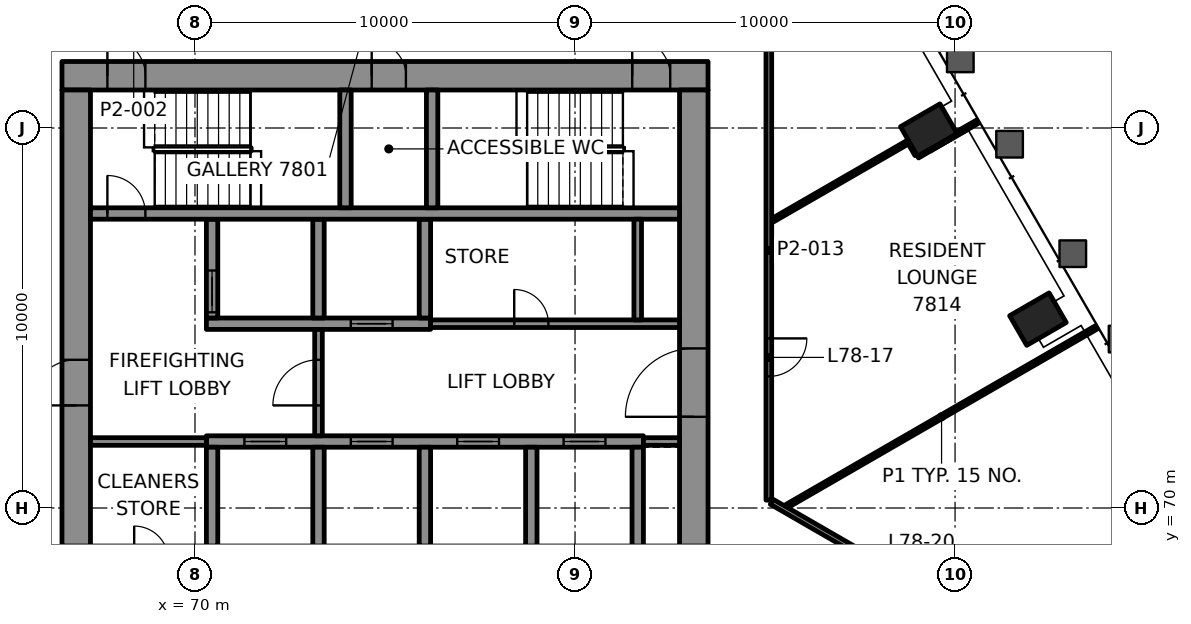
"""IFC4 building model, lengths in metres.
Left out: names, types, materials, properties, quantities, classifications, styles, units other than length and angle.
Written with IfcOpenShell. Run it as: python <this file> out.ifc"""

import sys

from ifc_helpers import new_model, si_unit, direction, frame, frame_2d, origin, origin_2d, place, context, subcontext, project, spatial, rectangle, hollow_rectangle, extrude, element, fill, save


model = new_model("IFC4")
c1 = context("Model", 3, precision=1e-05, world=origin(), true_north=direction((0.0, 1.0)))
c2 = subcontext(c1, "Body", "Model", "MODEL_VIEW")
j1 = project(units=[si_unit("LENGTHUNIT", "METRE"), si_unit("PLANEANGLEUNIT", "RADIAN")], contexts=[c1])
p1 = place(None, origin())
s1 = spatial("IfcSite", under=j1, at=p1, CompositionType="ELEMENT")
p2 = place(p1, origin())
s2 = spatial("IfcBuilding", under=s1, at=p2, CompositionType="ELEMENT")
p3 = place(p2, frame((0.0, 0.0, 319.6)))
s3 = spatial("IfcBuildingStorey", under=s2, at=p3, CompositionType="ELEMENT", Elevation=319.6)
for number, where, z_axis, x_axis in (
    (1, (92.181, 74.97, -0.0), (0.0, 0.0, 1.0), (-0.5, 0.866, 0.0)),
    (2, (89.309, 79.945, -0.0), (0.0, 0.0, 1.0), (-0.5, 0.866, 0.0)),
):
    element("IfcColumn", number, at=place(p3, frame(where, z_axis=z_axis, x_axis=x_axis)), inside=s3, PredefinedType="COLUMN", context=c2, shape_type="SweptSolid", body=[
        extrude(hollow_rectangle(XDim=0.9, YDim=1.2, WallThickness=0.06, at=origin_2d()), origin(), (0.0, 0.0, 1.0), 3.5),
    ])
p4 = place(p3, frame((66.5, 81.375, 0.0), z_axis=(0.0, 0.0, 1.0), x_axis=(1.0, 0.0, 0.0)))
e3 = element("IfcWall", 3, at=p4, inside=s3, PredefinedType="SHEAR", context=c2, shape_type="SweptSolid", body=[
    extrude(rectangle(XDim=17.0, YDim=0.75, at=frame_2d((8.5, 0.0))), origin(), (0.0, 0.0, 1.0), 3.3),
])
p5 = place(p4, frame((1.195, 0.0, 0.0)))
e4 = element("IfcOpeningElement", 4, at=p5, cuts=e3, PredefinedType="OPENING", context=c2, shape_type="SweptSolid", body=[
    extrude(rectangle(XDim=1.0, YDim=2.1, at=frame_2d((0.5, 1.05))), frame((0.0, 0.385, 0.0), z_axis=(0.0, -1.0, 0.0), x_axis=(1.0, 0.0, 0.0)), (0.0, 0.0, 1.0), 0.77),
])
p6 = place(p4, frame((15.005, 0.0, 0.0)))
e5 = element("IfcOpeningElement", 5, at=p6, cuts=e3, PredefinedType="OPENING", context=c2, shape_type="SweptSolid", body=[
    extrude(rectangle(XDim=1.0, YDim=2.1, at=frame_2d((0.5, 1.05))), frame((0.0, 0.385, 0.0), z_axis=(0.0, -1.0, 0.0), x_axis=(1.0, 0.0, 0.0)), (0.0, 0.0, 1.0), 0.77),
])
p7 = place(p4, frame((8.15, 0.0, 0.0)))
e6 = element("IfcOpeningElement", 6, at=p7, cuts=e3, PredefinedType="OPENING", context=c2, shape_type="SweptSolid", body=[
    extrude(rectangle(XDim=0.9, YDim=2.1, at=frame_2d((0.45, 1.05))), frame((0.0, 0.385, 0.0), z_axis=(0.0, -1.0, 0.0), x_axis=(1.0, 0.0, 0.0)), (0.0, 0.0, 1.0), 0.77),
])
p8 = place(p3, frame((66.875, 69.0, 0.0), z_axis=(0.0, 0.0, 1.0), x_axis=(0.0, 1.0, 0.0)))
e7 = element("IfcWall", 7, at=p8, inside=s3, PredefinedType="SHEAR", context=c2, shape_type="SweptSolid", body=[
    extrude(rectangle(XDim=12.0, YDim=0.75, at=frame_2d((6.0, 0.0))), origin(), (0.0, 0.0, 1.0), 3.3),
])
p9 = place(p8, frame((3.7, 0.0, 0.0)))
e8 = element("IfcOpeningElement", 8, at=p9, cuts=e7, PredefinedType="OPENING", context=c2, shape_type="SweptSolid", body=[
    extrude(rectangle(XDim=1.2, YDim=2.1, at=frame_2d((0.6, 1.05))), frame((0.0, 0.385, 0.0), z_axis=(0.0, -1.0, 0.0), x_axis=(1.0, 0.0, 0.0)), (0.0, 0.0, 1.0), 0.77),
])
p10 = place(p3, frame((83.125, 69.0, 0.0), z_axis=(0.0, 0.0, 1.0), x_axis=(0.0, 1.0, 0.0)))
e9 = element("IfcWall", 9, at=p10, inside=s3, PredefinedType="SHEAR", context=c2, shape_type="SweptSolid", body=[
    extrude(rectangle(XDim=12.0, YDim=0.75, at=frame_2d((6.0, 0.0))), origin(), (0.0, 0.0, 1.0), 3.3),
])
p11 = place(p10, frame((3.4, 0.0, 0.0)))
e10 = element("IfcOpeningElement", 10, at=p11, cuts=e9, PredefinedType="OPENING", context=c2, shape_type="SweptSolid", body=[
    extrude(rectangle(XDim=1.8, YDim=2.1, at=frame_2d((0.9, 1.05))), frame((0.0, 0.385, 0.0), z_axis=(0.0, -1.0, 0.0), x_axis=(1.0, 0.0, 0.0)), (0.0, 0.0, 1.0), 0.77),
])
p12 = place(p3, frame((70.3, 71.75, 0.0), z_axis=(0.0, 0.0, 1.0), x_axis=(1.0, 0.0, 0.0)))
e11 = element("IfcWall", 11, at=p12, inside=s3, PredefinedType="SHEAR", context=c2, shape_type="SweptSolid", body=[
    extrude(rectangle(XDim=11.5, YDim=0.3, at=frame_2d((5.75, 0.0))), origin(), (0.0, 0.0, 1.0), 3.3),
])
p13 = place(p12, frame((1.0, 0.0, 0.0)))
e12 = element("IfcOpeningElement", 12, at=p13, cuts=e11, PredefinedType="OPENING", context=c2, shape_type="SweptSolid", body=[
    extrude(rectangle(XDim=1.1, YDim=2.1, at=frame_2d((0.55, 1.05))), frame((0.0, 0.16, 0.0), z_axis=(0.0, -1.0, 0.0), x_axis=(1.0, 0.0, 0.0)), (0.0, 0.0, 1.0), 0.32),
])
p14 = place(p12, frame((3.8, 0.0, 0.0)))
e13 = element("IfcOpeningElement", 13, at=p14, cuts=e11, PredefinedType="OPENING", context=c2, shape_type="SweptSolid", body=[
    extrude(rectangle(XDim=1.1, YDim=2.1, at=frame_2d((0.55, 1.05))), frame((0.0, 0.16, 0.0), z_axis=(0.0, -1.0, 0.0), x_axis=(1.0, 0.0, 0.0)), (0.0, 0.0, 1.0), 0.32),
])
p15 = place(p12, frame((6.6, 0.0, 0.0)))
e14 = element("IfcOpeningElement", 14, at=p15, cuts=e11, PredefinedType="OPENING", context=c2, shape_type="SweptSolid", body=[
    extrude(rectangle(XDim=1.1, YDim=2.1, at=frame_2d((0.55, 1.05))), frame((0.0, 0.16, 0.0), z_axis=(0.0, -1.0, 0.0), x_axis=(1.0, 0.0, 0.0)), (0.0, 0.0, 1.0), 0.32),
])
p16 = place(p12, frame((9.4, 0.0, 0.0)))
e15 = element("IfcOpeningElement", 15, at=p16, cuts=e11, PredefinedType="OPENING", context=c2, shape_type="SweptSolid", body=[
    extrude(rectangle(XDim=1.1, YDim=2.1, at=frame_2d((0.55, 1.05))), frame((0.0, 0.16, 0.0), z_axis=(0.0, -1.0, 0.0), x_axis=(1.0, 0.0, 0.0)), (0.0, 0.0, 1.0), 0.32),
])
p17 = place(p3, frame((70.3, 74.85, 0.0), z_axis=(0.0, 0.0, 1.0), x_axis=(1.0, 0.0, 0.0)))
e16 = element("IfcWall", 16, at=p17, inside=s3, PredefinedType="SHEAR", context=c2, shape_type="SweptSolid", body=[
    extrude(rectangle(XDim=5.9, YDim=0.3, at=frame_2d((2.95, 0.0))), origin(), (0.0, 0.0, 1.0), 3.3),
])
p18 = place(p17, frame((3.8, 0.0, 0.0)))
e17 = element("IfcOpeningElement", 17, at=p18, cuts=e16, PredefinedType="OPENING", context=c2, shape_type="SweptSolid", body=[
    extrude(rectangle(XDim=1.1, YDim=2.1, at=frame_2d((0.55, 1.05))), frame((0.0, 0.16, 0.0), z_axis=(0.0, -1.0, 0.0), x_axis=(1.0, 0.0, 0.0)), (0.0, 0.0, 1.0), 0.32),
])
p19 = place(p3, frame((70.45, 69.0, 0.0), z_axis=(0.0, 0.0, 1.0), x_axis=(0.0, 1.0, 0.0)))
e18 = element("IfcWall", 18, at=p19, inside=s3, PredefinedType="SHEAR", context=c2, shape_type="SweptSolid", body=[
    extrude(rectangle(XDim=2.6, YDim=0.3, at=frame_2d((1.3, 0.0))), origin(), (0.0, 0.0, 1.0), 3.3),
])
p20 = place(p3, frame((70.45, 75.0, 0.0), z_axis=(0.0, 0.0, 1.0), x_axis=(0.0, 1.0, 0.0)))
e19 = element("IfcWall", 19, at=p20, inside=s3, PredefinedType="SHEAR", context=c2, shape_type="SweptSolid", body=[
    extrude(rectangle(XDim=2.6, YDim=0.3, at=frame_2d((1.3, 0.0))), origin(), (0.0, 0.0, 1.0), 3.3),
])
p21 = place(p20, frame((0.15, 0.0, 0.0)))
e20 = element("IfcOpeningElement", 20, at=p21, cuts=e19, PredefinedType="OPENING", context=c2, shape_type="SweptSolid", body=[
    extrude(rectangle(XDim=1.1, YDim=2.1, at=frame_2d((0.55, 1.05))), frame((0.0, 0.16, 0.0), z_axis=(0.0, -1.0, 0.0), x_axis=(1.0, 0.0, 0.0)), (0.0, 0.0, 1.0), 0.32),
])
for number, where, z_axis, x_axis in (
    (21, (73.25, 69.0, 0.0), (0.0, 0.0, 1.0), (0.0, 1.0, 0.0)),
    (22, (73.25, 75.0, 0.0), (0.0, 0.0, 1.0), (0.0, 1.0, 0.0)),
    (23, (76.05, 69.0, 0.0), (0.0, 0.0, 1.0), (0.0, 1.0, 0.0)),
    (24, (76.05, 75.0, 0.0), (0.0, 0.0, 1.0), (0.0, 1.0, 0.0)),
    (25, (78.85, 69.0, 0.0), (0.0, 0.0, 1.0), (0.0, 1.0, 0.0)),
    (26, (81.65, 69.0, 0.0), (0.0, 0.0, 1.0), (0.0, 1.0, 0.0)),
):
    element("IfcWall", number, at=place(p3, frame(where, z_axis=z_axis, x_axis=x_axis)), inside=s3, PredefinedType="SHEAR", context=c2, shape_type="SweptSolid", body=[
        extrude(rectangle(XDim=2.6, YDim=0.3, at=frame_2d((1.3, 0.0))), origin(), (0.0, 0.0, 1.0), 3.3),
    ])
p22 = place(p3, frame((67.25, 77.75, 0.0), z_axis=(0.0, 0.0, 1.0), x_axis=(1.0, 0.0, 0.0)))
e27 = element("IfcWall", 27, at=p22, inside=s3, PredefinedType="SHEAR", context=c2, shape_type="SweptSolid", body=[
    extrude(rectangle(XDim=15.5, YDim=0.3, at=frame_2d((7.75, 0.0))), origin(), (0.0, 0.0, 1.0), 3.3),
])
p23 = place(p22, frame((0.445, 0.0, 0.0)))
e28 = element("IfcOpeningElement", 28, at=p23, cuts=e27, PredefinedType="OPENING", context=c2, shape_type="SweptSolid", body=[
    extrude(rectangle(XDim=1.0, YDim=2.1, at=frame_2d((0.5, 1.05))), frame((0.0, 0.16, 0.0), z_axis=(0.0, -1.0, 0.0), x_axis=(1.0, 0.0, 0.0)), (0.0, 0.0, 1.0), 0.32),
])
for number, where, z_axis, x_axis in (
    (29, (73.96, 77.9, 0.0), (0.0, 0.0, 1.0), (0.0, 1.0, 0.0)),
    (30, (76.24, 77.9, 0.0), (0.0, 0.0, 1.0), (0.0, 1.0, 0.0)),
):
    element("IfcWall", number, at=place(p3, frame(where, z_axis=z_axis, x_axis=x_axis)), inside=s3, PredefinedType="SHEAR", context=c2, shape_type="SweptSolid", body=[
        extrude(rectangle(XDim=3.1, YDim=0.3, at=frame_2d((1.55, 0.0))), origin(), (0.0, 0.0, 1.0), 3.3),
    ])
p24 = place(p3, frame((85.574, 70.051, 0.0), z_axis=(0.0, 0.0, 1.0), x_axis=(0.86601302732, 0.500021436052, 0.0)))
e31 = element("IfcWall", 31, at=p24, inside=s3, PredefinedType="PARTITIONING", context=c2, shape_type="SweptSolid", body=[
    extrude(rectangle(XDim=9.401, YDim=0.1, at=frame_2d((4.7, 0.0))), origin(), (0.0, 0.0, 1.0), 2.688),
])
p25 = place(p3, frame((89.014, 79.255, 0.0), z_axis=(0.0, 0.0, 1.0), x_axis=(0.866038107287, 0.499977996243, 0.0)))
e32 = element("IfcWall", 32, at=p25, inside=s3, PredefinedType="PARTITIONING", context=c2, shape_type="SweptSolid", body=[
    extrude(rectangle(XDim=1.819, YDim=0.1, at=frame_2d((0.91, 0.0))), origin(), (0.0, 0.0, 1.0), 2.688),
])
p26 = place(p3, frame((85.201, 77.573, 0.0), z_axis=(0.0, 0.0, 1.0), x_axis=(0.866029543084, 0.499992830454, 0.0)))
e33 = element("IfcWall", 33, at=p26, inside=s3, PredefinedType="PARTITIONING", context=c2, shape_type="SweptSolid", body=[
    extrude(rectangle(XDim=4.143, YDim=0.1, at=frame_2d((2.071, 0.0))), origin(), (0.0, 0.0, 1.0), 2.7),
])
p27 = place(p3, frame((85.1, 83.349, 0.0), z_axis=(0.0, 0.0, 1.0), x_axis=(0.0, -1.0, 0.0)))
e34 = element("IfcWall", 34, at=p27, inside=s3, PredefinedType="PARTITIONING", context=c2, shape_type="SweptSolid", body=[
    extrude(rectangle(XDim=13.141, YDim=0.15, at=frame_2d((6.571, 0.0))), origin(), (0.0, 0.0, 1.0), 2.7),
])
p28 = place(p27, frame((8.886, 0.0, 0.0)))
e35 = element("IfcOpeningElement", 35, at=p28, cuts=e34, PredefinedType="OPENING", context=c2, shape_type="SweptSolid", body=[
    extrude(rectangle(XDim=1.0, YDim=2.1, at=frame_2d((0.5, 1.05))), frame((0.0, 0.085, 0.0), z_axis=(0.0, -1.0, 0.0), x_axis=(1.0, 0.0, 0.0)), (0.0, 0.0, 1.0), 0.17),
])
p29 = place(p3, frame((88.989, 79.299, 0.0), z_axis=(0.0, 0.0, 1.0), x_axis=(-0.500126092966, 0.865952591736, 0.0)))
e36 = element("IfcWall", 36, at=p29, inside=s3, PredefinedType="PARTITIONING", context=c2, shape_type="SweptSolid", body=[
    extrude(rectangle(XDim=0.349, YDim=0.1, at=frame_2d((0.175, 0.0))), origin(), (0.0, 0.0, 1.0), 2.7),
])
p30 = place(p3, frame((85.175, 70.165, 0.0), z_axis=(0.0, 0.0, 1.0), x_axis=(0.866024989193, -0.500000718093, 0.0)))
e37 = element("IfcWall", 37, at=p30, inside=s3, PredefinedType="PARTITIONING", context=c2, shape_type="SweptSolid", body=[
    extrude(rectangle(XDim=11.063, YDim=0.15, at=frame_2d((5.531, 0.0))), origin(), (0.0, 0.0, 1.0), 2.7),
])
p31 = place(p30, frame((5.102, 0.0, 0.0)))
e38 = element("IfcOpeningElement", 38, at=p31, cuts=e37, PredefinedType="OPENING", context=c2, shape_type="SweptSolid", body=[
    extrude(rectangle(XDim=1.0, YDim=2.1, at=frame_2d((0.5, 1.05))), frame((0.0, 0.085, 0.0), z_axis=(0.0, -1.0, 0.0), x_axis=(1.0, 0.0, 0.0)), (0.0, 0.0, 1.0), 0.17),
])
p32 = place(p3, frame((69.117, 103.238, 0.0), z_axis=(0.0, 0.0, 1.0), x_axis=(-0.500002433271, -0.86602399893, 0.0)))
e39 = element("IfcWall", 39, at=p32, inside=s3, PredefinedType="SOLIDWALL", context=c2, shape_type="SweptSolid", body=[
    extrude(rectangle(XDim=29.715, YDim=0.8, at=frame_2d((14.857, 0.0))), origin(), (0.0, 0.0, 1.0), 0.9),
])
p33 = place(p3, frame((67.25, 71.75, 0.0), z_axis=(0.0, 0.0, 1.0), x_axis=(1.0, 0.0, 0.0)))
e40 = element("IfcWall", 40, at=p33, inside=s3, PredefinedType="PARTITIONING", context=c2, shape_type="SweptSolid", body=[
    extrude(rectangle(XDim=3.05, YDim=0.2, at=frame_2d((1.525, 0.0))), origin(), (0.0, 0.0, 1.0), 3.3),
])
p34 = place(p3, frame((81.8, 71.75, 0.0), z_axis=(0.0, 0.0, 1.0), x_axis=(1.0, 0.0, 0.0)))
e41 = element("IfcWall", 41, at=p34, inside=s3, PredefinedType="PARTITIONING", context=c2, shape_type="SweptSolid", body=[
    extrude(rectangle(XDim=0.95, YDim=0.2, at=frame_2d((0.475, 0.0))), origin(), (0.0, 0.0, 1.0), 3.3),
])
p35 = place(p3, frame((76.2, 74.85, 0.0), z_axis=(0.0, 0.0, 1.0), x_axis=(1.0, 0.0, 0.0)))
e42 = element("IfcWall", 42, at=p35, inside=s3, PredefinedType="PARTITIONING", context=c2, shape_type="SweptSolid", body=[
    extrude(rectangle(XDim=6.55, YDim=0.2, at=frame_2d((3.275, 0.0))), origin(), (0.0, 0.0, 1.0), 3.3),
])
p36 = place(p35, frame((2.2, 0.0, 0.0)))
e43 = element("IfcOpeningElement", 43, at=p36, cuts=e42, PredefinedType="OPENING", context=c2, shape_type="SweptSolid", body=[
    extrude(rectangle(XDim=0.9, YDim=2.1, at=frame_2d((0.45, 1.05))), frame((0.0, 0.11, 0.0), z_axis=(0.0, -1.0, 0.0), x_axis=(1.0, 0.0, 0.0)), (0.0, 0.0, 1.0), 0.22),
])
p37 = place(p3, frame((73.25, 71.9, 0.0), z_axis=(0.0, 0.0, 1.0), x_axis=(0.0, 1.0, 0.0)))
e44 = element("IfcWall", 44, at=p37, inside=s3, PredefinedType="PARTITIONING", context=c2, shape_type="SweptSolid", body=[
    extrude(rectangle(XDim=2.8, YDim=0.2, at=frame_2d((1.4, 0.0))), origin(), (0.0, 0.0, 1.0), 3.3),
])
p38 = place(p37, frame((0.8, 0.0, 0.0)))
e45 = element("IfcOpeningElement", 45, at=p38, cuts=e44, PredefinedType="OPENING", context=c2, shape_type="SweptSolid", body=[
    extrude(rectangle(XDim=1.2, YDim=2.1, at=frame_2d((0.6, 1.05))), frame((0.0, 0.11, 0.0), z_axis=(0.0, -1.0, 0.0), x_axis=(1.0, 0.0, 0.0)), (0.0, 0.0, 1.0), 0.22),
])
p39 = place(p3, frame((81.65, 74.95, 0.0), z_axis=(0.0, 0.0, 1.0), x_axis=(0.0, 1.0, 0.0)))
e46 = element("IfcWall", 46, at=p39, inside=s3, PredefinedType="PARTITIONING", context=c2, shape_type="SweptSolid", body=[
    extrude(rectangle(XDim=2.65, YDim=0.2, at=frame_2d((1.325, 0.0))), origin(), (0.0, 0.0, 1.0), 3.3),
])
p40 = place(p28, origin())
e47 = element("IfcDoor", 47, at=p40, inside=s3, OperationType="SINGLE_SWING_RIGHT", PredefinedType="DOOR", context=c2, shape_type="SweptSolid", body=[
    extrude(rectangle(XDim=1.0, YDim=2.1, at=frame_2d((0.5, 1.05))), frame((0.0, 0.025, 0.0), z_axis=(0.0, -1.0, 0.0), x_axis=(1.0, 0.0, 0.0)), (0.0, 0.0, 1.0), 0.05),
])
fill(e35, e47)
p41 = place(p13, origin())
e48 = element("IfcDoor", 48, at=p41, inside=s3, OperationType="DOUBLE_DOOR_SLIDING", PredefinedType="DOOR", context=c2, shape_type="SweptSolid", body=[
    extrude(rectangle(XDim=1.1, YDim=2.1, at=frame_2d((0.55, 1.05))), frame((0.0, 0.025, 0.0), z_axis=(0.0, -1.0, 0.0), x_axis=(1.0, 0.0, 0.0)), (0.0, 0.0, 1.0), 0.05),
])
fill(e12, e48)
p42 = place(p14, origin())
e49 = element("IfcDoor", 49, at=p42, inside=s3, OperationType="DOUBLE_DOOR_SLIDING", PredefinedType="DOOR", context=c2, shape_type="SweptSolid", body=[
    extrude(rectangle(XDim=1.1, YDim=2.1, at=frame_2d((0.55, 1.05))), frame((0.0, 0.025, 0.0), z_axis=(0.0, -1.0, 0.0), x_axis=(1.0, 0.0, 0.0)), (0.0, 0.0, 1.0), 0.05),
])
fill(e13, e49)
p43 = place(p15, origin())
e50 = element("IfcDoor", 50, at=p43, inside=s3, OperationType="DOUBLE_DOOR_SLIDING", PredefinedType="DOOR", context=c2, shape_type="SweptSolid", body=[
    extrude(rectangle(XDim=1.1, YDim=2.1, at=frame_2d((0.55, 1.05))), frame((0.0, 0.025, 0.0), z_axis=(0.0, -1.0, 0.0), x_axis=(1.0, 0.0, 0.0)), (0.0, 0.0, 1.0), 0.05),
])
fill(e14, e50)
p44 = place(p16, origin())
e51 = element("IfcDoor", 51, at=p44, inside=s3, OperationType="DOUBLE_DOOR_SLIDING", PredefinedType="DOOR", context=c2, shape_type="SweptSolid", body=[
    extrude(rectangle(XDim=1.1, YDim=2.1, at=frame_2d((0.55, 1.05))), frame((0.0, 0.025, 0.0), z_axis=(0.0, -1.0, 0.0), x_axis=(1.0, 0.0, 0.0)), (0.0, 0.0, 1.0), 0.05),
])
fill(e15, e51)
p45 = place(p21, origin())
e52 = element("IfcDoor", 52, at=p45, inside=s3, OperationType="DOUBLE_DOOR_SLIDING", PredefinedType="DOOR", context=c2, shape_type="SweptSolid", body=[
    extrude(rectangle(XDim=1.1, YDim=2.1, at=frame_2d((0.55, 1.05))), frame((0.0, 0.025, 0.0), z_axis=(0.0, -1.0, 0.0), x_axis=(1.0, 0.0, 0.0)), (0.0, 0.0, 1.0), 0.05),
])
fill(e20, e52)
p46 = place(p18, origin())
e53 = element("IfcDoor", 53, at=p46, inside=s3, OperationType="DOUBLE_DOOR_SLIDING", PredefinedType="DOOR", context=c2, shape_type="SweptSolid", body=[
    extrude(rectangle(XDim=1.1, YDim=2.1, at=frame_2d((0.55, 1.05))), frame((0.0, 0.025, 0.0), z_axis=(0.0, -1.0, 0.0), x_axis=(1.0, 0.0, 0.0)), (0.0, 0.0, 1.0), 0.05),
])
fill(e17, e53)
p47 = place(p23, origin())
e54 = element("IfcDoor", 54, at=p47, inside=s3, OperationType="SINGLE_SWING_LEFT", PredefinedType="DOOR", context=c2, shape_type="SweptSolid", body=[
    extrude(rectangle(XDim=1.0, YDim=2.1, at=frame_2d((0.5, 1.05))), frame((0.0, 0.025, 0.0), z_axis=(0.0, -1.0, 0.0), x_axis=(1.0, 0.0, 0.0)), (0.0, 0.0, 1.0), 0.05),
])
fill(e28, e54)
p48 = place(p5, origin())
e55 = element("IfcDoor", 55, at=p48, inside=s3, OperationType="SINGLE_SWING_RIGHT", PredefinedType="DOOR", context=c2, shape_type="SweptSolid", body=[
    extrude(rectangle(XDim=1.0, YDim=2.1, at=frame_2d((0.5, 1.05))), frame((0.0, 0.095, 0.0), z_axis=(0.0, -1.0, 0.0), x_axis=(1.0, 0.0, 0.0)), (0.0, 0.0, 1.0), 0.19),
])
fill(e4, e55)
p49 = place(p6, origin())
e56 = element("IfcDoor", 56, at=p49, inside=s3, OperationType="SINGLE_SWING_LEFT", PredefinedType="DOOR", context=c2, shape_type="SweptSolid", body=[
    extrude(rectangle(XDim=1.0, YDim=2.1, at=frame_2d((0.5, 1.05))), frame((0.0, 0.095, 0.0), z_axis=(0.0, -1.0, 0.0), x_axis=(1.0, 0.0, 0.0)), (0.0, 0.0, 1.0), 0.19),
])
fill(e5, e56)
p50 = place(p38, origin())
e57 = element("IfcDoor", 57, at=p50, inside=s3, OperationType="SINGLE_SWING_LEFT", PredefinedType="DOOR", context=c2, shape_type="SweptSolid", body=[
    extrude(rectangle(XDim=1.2, YDim=2.1, at=frame_2d((0.6, 1.05))), frame((0.0, 0.025, 0.0), z_axis=(0.0, -1.0, 0.0), x_axis=(1.0, 0.0, 0.0)), (0.0, 0.0, 1.0), 0.05),
])
fill(e45, e57)
p51 = place(p9, origin())
e58 = element("IfcDoor", 58, at=p51, inside=s3, OperationType="SINGLE_SWING_RIGHT", PredefinedType="DOOR", context=c2, shape_type="SweptSolid", body=[
    extrude(rectangle(XDim=1.2, YDim=2.1, at=frame_2d((0.6, 1.05))), frame((0.0, 0.095, 0.0), z_axis=(0.0, -1.0, 0.0), x_axis=(1.0, 0.0, 0.0)), (0.0, 0.0, 1.0), 0.19),
])
fill(e8, e58)
p52 = place(p11, origin())
e59 = element("IfcDoor", 59, at=p52, inside=s3, OperationType="SINGLE_SWING_LEFT", PredefinedType="DOOR", context=c2, shape_type="SweptSolid", body=[
    extrude(rectangle(XDim=1.8, YDim=2.1, at=frame_2d((0.9, 1.05))), frame((0.0, 0.095, 0.0), z_axis=(0.0, -1.0, 0.0), x_axis=(1.0, 0.0, 0.0)), (0.0, 0.0, 1.0), 0.19),
])
fill(e10, e59)
p53 = place(p36, origin())
e60 = element("IfcDoor", 60, at=p53, inside=s3, OperationType="SINGLE_SWING_LEFT", PredefinedType="DOOR", context=c2, shape_type="SweptSolid", body=[
    extrude(rectangle(XDim=0.9, YDim=2.1, at=frame_2d((0.45, 1.05))), frame((0.0, 0.025, 0.0), z_axis=(0.0, -1.0, 0.0), x_axis=(1.0, 0.0, 0.0)), (0.0, 0.0, 1.0), 0.05),
])
fill(e43, e60)
p54 = place(p7, origin())
e61 = element("IfcDoor", 61, at=p54, inside=s3, OperationType="SINGLE_SWING_RIGHT", PredefinedType="DOOR", context=c2, shape_type="SweptSolid", body=[
    extrude(rectangle(XDim=0.9, YDim=2.1, at=frame_2d((0.45, 1.05))), frame((0.0, 0.095, 0.0), z_axis=(0.0, -1.0, 0.0), x_axis=(1.0, 0.0, 0.0)), (0.0, 0.0, 1.0), 0.19),
])
fill(e6, e61)
save(model, sys.argv[1])
